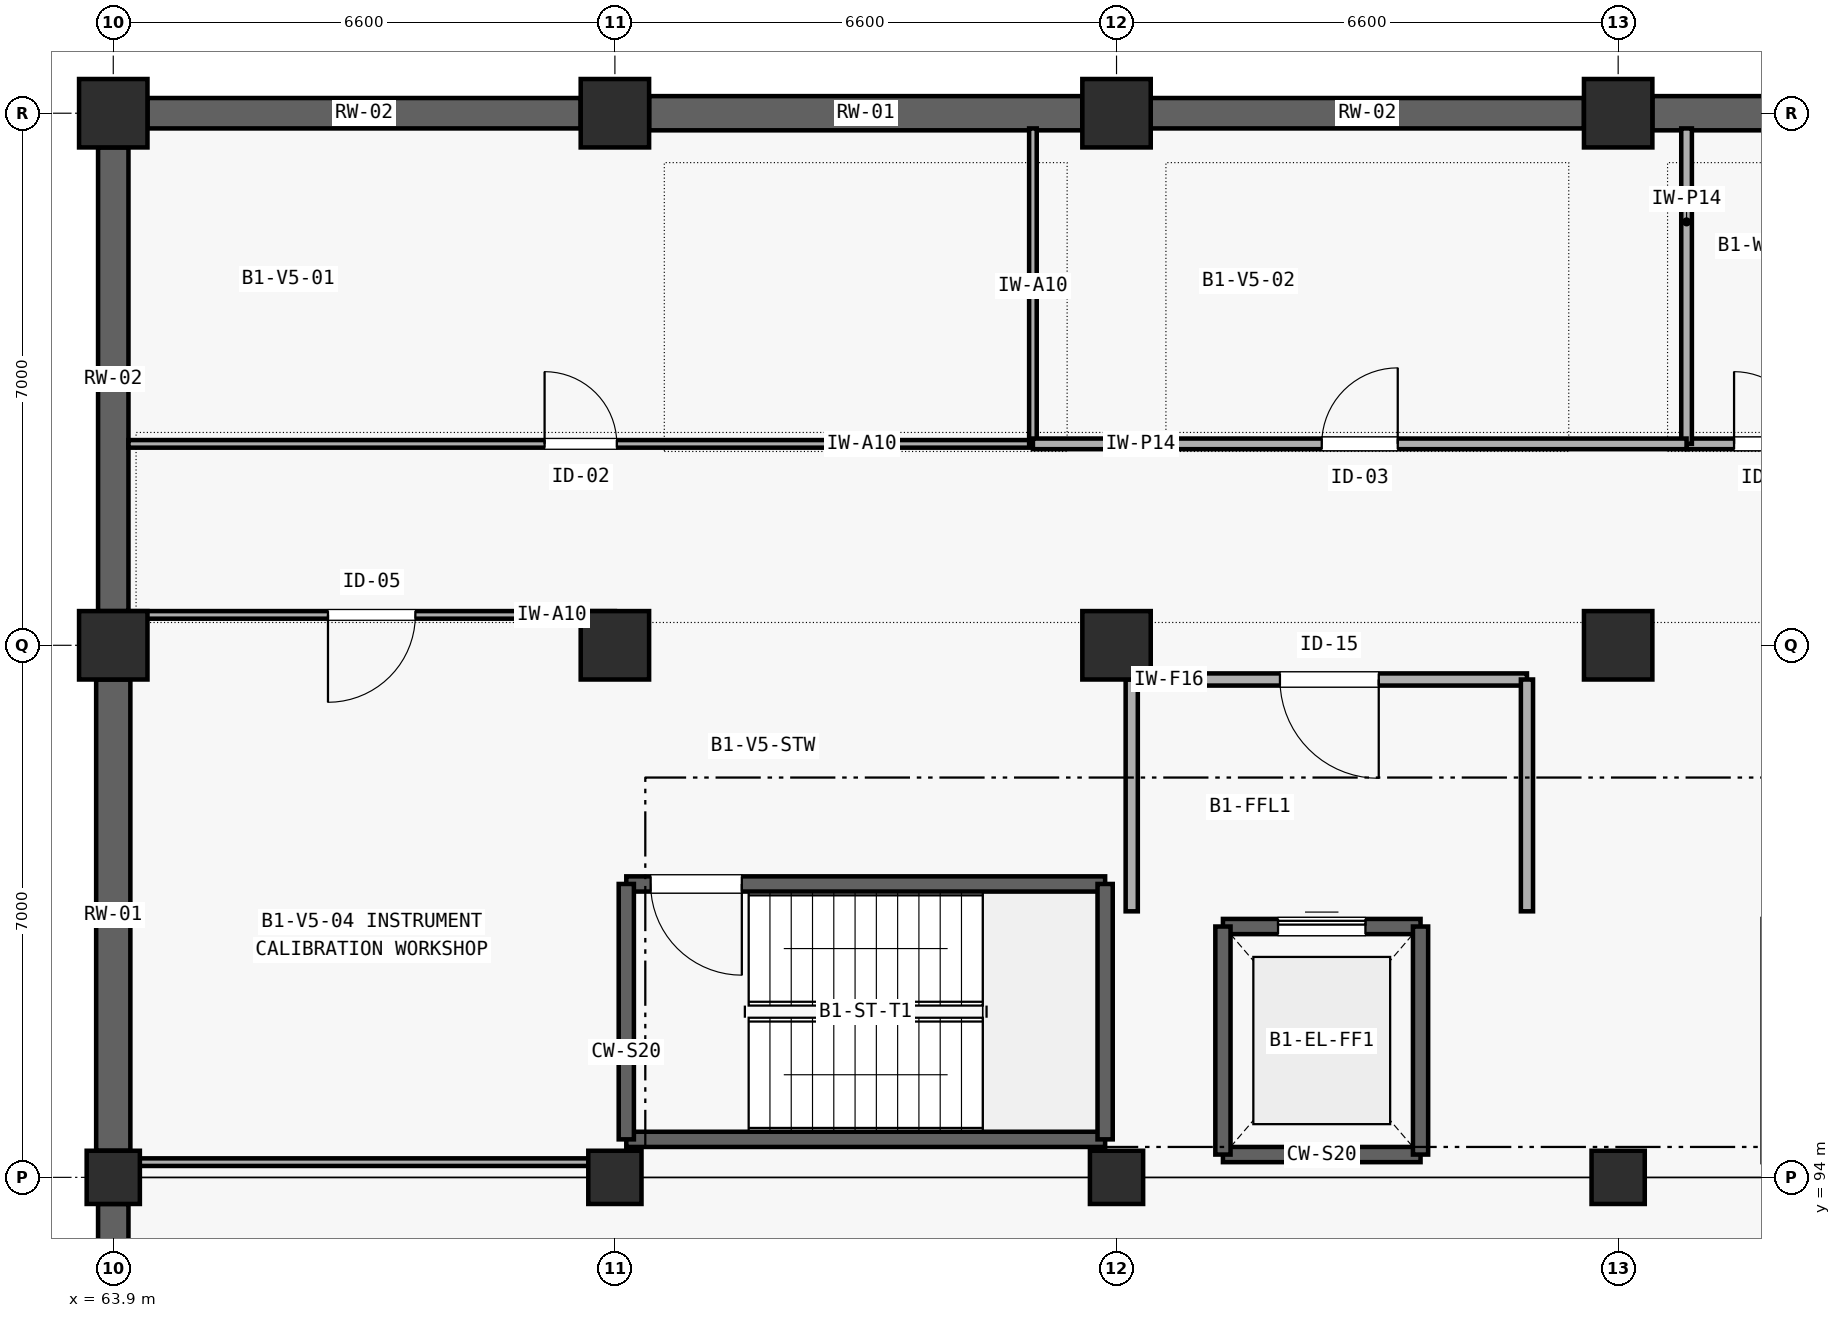
"""IFC4 building model, lengths in metres.
Left out: names, types, materials, properties, quantities, classifications, styles, units other than length and angle.
Written with IfcOpenShell. Run it as: python <this file> out.ifc"""

import sys

from ifc_helpers import new_model, si_unit, direction, frame, frame_2d, origin, origin_2d, place, context, subcontext, project, spatial, rectangle, extrude, element, fill, save


model = new_model("IFC4")
c1 = context("Model", 3, precision=1e-05, world=origin(), true_north=direction((0.0, 1.0)))
c2 = subcontext(c1, "Body", "Model", "MODEL_VIEW")
j1 = project(units=[si_unit("LENGTHUNIT", "METRE"), si_unit("PLANEANGLEUNIT", "RADIAN")], contexts=[c1])
p1 = place(None, origin())
s1 = spatial("IfcSite", under=j1, at=p1, CompositionType="ELEMENT")
p2 = place(p1, origin())
s2 = spatial("IfcBuilding", under=s1, at=p2, CompositionType="ELEMENT")
p3 = place(p2, frame((0.0, 0.0, -4.2)))
s3 = spatial("IfcBuildingStorey", under=s2, at=p3, CompositionType="ELEMENT", Elevation=-4.2)
p4 = place(p3, frame((63.9, 94.0, -0.4), z_axis=(0.0, 0.0, 1.0), x_axis=(1.0, 0.0, 0.0)))
e1 = element("IfcColumn", 1, at=p4, inside=s3, PredefinedType="COLUMN", context=c2, shape_type="SweptSolid", body=[
    extrude(rectangle(XDim=0.7, YDim=0.7, at=origin_2d()), origin(), (0.0, 0.0, 1.0), 4.6),
])
for number, where, z_axis, x_axis in (
    (2, (63.9, 101.0, -0.4), (0.0, 0.0, 1.0), (1.0, 0.0, 0.0)),
    (3, (63.9, 108.0, -0.4), (0.0, 0.0, 1.0), (1.0, 0.0, 0.0)),
):
    element("IfcColumn", number, at=place(p3, frame(where, z_axis=z_axis, x_axis=x_axis)), inside=s3, PredefinedType="COLUMN", context=c2, shape_type="SweptSolid", body=[
        extrude(rectangle(XDim=0.9, YDim=0.9, at=origin_2d()), origin(), (0.0, 0.0, 1.0), 4.6),
    ])
p5 = place(p3, frame((70.5, 94.0, -0.4), z_axis=(0.0, 0.0, 1.0), x_axis=(1.0, 0.0, 0.0)))
e4 = element("IfcColumn", 4, at=p5, inside=s3, PredefinedType="COLUMN", context=c2, shape_type="SweptSolid", body=[
    extrude(rectangle(XDim=0.7, YDim=0.7, at=origin_2d()), origin(), (0.0, 0.0, 1.0), 4.6),
])
for number, where, z_axis, x_axis in (
    (5, (70.5, 101.0, -0.4), (0.0, 0.0, 1.0), (1.0, 0.0, 0.0)),
    (6, (70.5, 108.0, -0.4), (0.0, 0.0, 1.0), (1.0, 0.0, 0.0)),
):
    element("IfcColumn", number, at=place(p3, frame(where, z_axis=z_axis, x_axis=x_axis)), inside=s3, PredefinedType="COLUMN", context=c2, shape_type="SweptSolid", body=[
        extrude(rectangle(XDim=0.9, YDim=0.9, at=origin_2d()), origin(), (0.0, 0.0, 1.0), 4.6),
    ])
p6 = place(p3, frame((77.1, 94.0, -0.4), z_axis=(0.0, 0.0, 1.0), x_axis=(1.0, 0.0, 0.0)))
e7 = element("IfcColumn", 7, at=p6, inside=s3, PredefinedType="COLUMN", context=c2, shape_type="SweptSolid", body=[
    extrude(rectangle(XDim=0.7, YDim=0.7, at=origin_2d()), origin(), (0.0, 0.0, 1.0), 4.6),
])
for number, where, z_axis, x_axis in (
    (8, (77.1, 101.0, -0.4), (0.0, 0.0, 1.0), (1.0, 0.0, 0.0)),
    (9, (77.1, 108.0, -0.4), (0.0, 0.0, 1.0), (1.0, 0.0, 0.0)),
):
    element("IfcColumn", number, at=place(p3, frame(where, z_axis=z_axis, x_axis=x_axis)), inside=s3, PredefinedType="COLUMN", context=c2, shape_type="SweptSolid", body=[
        extrude(rectangle(XDim=0.9, YDim=0.9, at=origin_2d()), origin(), (0.0, 0.0, 1.0), 4.6),
    ])
p7 = place(p3, frame((83.7, 94.0, -0.4), z_axis=(0.0, 0.0, 1.0), x_axis=(1.0, 0.0, 0.0)))
e10 = element("IfcColumn", 10, at=p7, inside=s3, PredefinedType="COLUMN", context=c2, shape_type="SweptSolid", body=[
    extrude(rectangle(XDim=0.7, YDim=0.7, at=origin_2d()), origin(), (0.0, 0.0, 1.0), 4.6),
])
for number, where, z_axis, x_axis in (
    (11, (83.7, 101.0, -0.4), (0.0, 0.0, 1.0), (1.0, 0.0, 0.0)),
    (12, (83.7, 108.0, -0.4), (0.0, 0.0, 1.0), (1.0, 0.0, 0.0)),
):
    element("IfcColumn", number, at=place(p3, frame(where, z_axis=z_axis, x_axis=x_axis)), inside=s3, PredefinedType="COLUMN", context=c2, shape_type="SweptSolid", body=[
        extrude(rectangle(XDim=0.9, YDim=0.9, at=origin_2d()), origin(), (0.0, 0.0, 1.0), 4.6),
    ])
p8 = place(p3, frame((64.35, 108.0, 0.0), z_axis=(0.0, 0.0, 1.0), x_axis=(1.0, 0.0, 0.0)))
e13 = element("IfcWall", 13, at=p8, inside=s3, PredefinedType="SHEAR", context=c2, shape_type="SweptSolid", body=[
    extrude(rectangle(XDim=5.7, YDim=0.4, at=frame_2d((2.85, 0.0))), origin(), (0.0, 0.0, 1.0), 3.85),
])
p9 = place(p3, frame((70.95, 108.0, 0.0), z_axis=(0.0, 0.0, 1.0), x_axis=(1.0, 0.0, 0.0)))
e14 = element("IfcWall", 14, at=p9, inside=s3, PredefinedType="SHEAR", context=c2, shape_type="SweptSolid", body=[
    extrude(rectangle(XDim=5.7, YDim=0.45, at=frame_2d((2.85, 0.0))), origin(), (0.0, 0.0, 1.0), 3.85),
])
p10 = place(p3, frame((77.55, 108.0, 0.0), z_axis=(0.0, 0.0, 1.0), x_axis=(1.0, 0.0, 0.0)))
e15 = element("IfcWall", 15, at=p10, inside=s3, PredefinedType="SHEAR", context=c2, shape_type="SweptSolid", body=[
    extrude(rectangle(XDim=5.7, YDim=0.4, at=frame_2d((2.85, 0.0))), origin(), (0.0, 0.0, 1.0), 3.85),
])
p11 = place(p3, frame((84.15, 108.0, 0.0), z_axis=(0.0, 0.0, 1.0), x_axis=(1.0, 0.0, 0.0)))
e16 = element("IfcWall", 16, at=p11, inside=s3, PredefinedType="SHEAR", context=c2, shape_type="SweptSolid", body=[
    extrude(rectangle(XDim=5.7, YDim=0.45, at=frame_2d((2.85, 0.0))), origin(), (0.0, 0.0, 1.0), 3.85),
])
p12 = place(p3, frame((63.9, 87.35, 0.0), z_axis=(0.0, 0.0, 1.0), x_axis=(0.0, 1.0, 0.0)))
e17 = element("IfcWall", 17, at=p12, inside=s3, PredefinedType="SHEAR", context=c2, shape_type="SweptSolid", body=[
    extrude(rectangle(XDim=6.3, YDim=0.4, at=frame_2d((3.15, 0.0))), origin(), (0.0, 0.0, 1.0), 3.85),
])
p13 = place(p3, frame((63.9, 94.35, 0.0), z_axis=(0.0, 0.0, 1.0), x_axis=(0.0, 1.0, 0.0)))
e18 = element("IfcWall", 18, at=p13, inside=s3, PredefinedType="SHEAR", context=c2, shape_type="SweptSolid", body=[
    extrude(rectangle(XDim=6.2, YDim=0.45, at=frame_2d((3.1, 0.0))), origin(), (0.0, 0.0, 1.0), 3.85),
])
p14 = place(p3, frame((63.9, 101.45, 0.0), z_axis=(0.0, 0.0, 1.0), x_axis=(0.0, 1.0, 0.0)))
e19 = element("IfcWall", 19, at=p14, inside=s3, PredefinedType="SHEAR", context=c2, shape_type="SweptSolid", body=[
    extrude(rectangle(XDim=6.1, YDim=0.4, at=frame_2d((3.05, 0.0))), origin(), (0.0, 0.0, 1.0), 3.85),
])
p15 = place(p3, frame((70.65, 94.5, -0.4), z_axis=(0.0, 0.0, 1.0), x_axis=(1.0, 0.0, 0.0)))
e20 = element("IfcWall", 20, at=p15, inside=s3, PredefinedType="SHEAR", context=c2, shape_type="SweptSolid", body=[
    extrude(rectangle(XDim=6.3, YDim=0.2, at=frame_2d((3.15, 0.0))), origin(), (0.0, 0.0, 1.0), 4.6),
])
p16 = place(p3, frame((70.65, 97.86, -0.4), z_axis=(0.0, 0.0, 1.0), x_axis=(1.0, 0.0, 0.0)))
e21 = element("IfcWall", 21, at=p16, inside=s3, PredefinedType="SHEAR", context=c2, shape_type="SweptSolid", body=[
    extrude(rectangle(XDim=6.3, YDim=0.2, at=frame_2d((3.15, 0.0))), origin(), (0.0, 0.0, 1.0), 4.6),
])
p17 = place(p16, frame((0.32, 0.0, 0.4)))
e22 = element("IfcOpeningElement", 22, at=p17, cuts=e21, PredefinedType="OPENING", context=c2, shape_type="SweptSolid", body=[
    extrude(rectangle(XDim=1.2, YDim=2.15, at=frame_2d((0.6, 1.075))), frame((0.0, 0.11, 0.0), z_axis=(0.0, -1.0, 0.0), x_axis=(1.0, 0.0, 0.0)), (0.0, 0.0, 1.0), 0.22),
])
for number, where, z_axis, x_axis in (
    (23, (70.65, 94.5, -0.4), (0.0, 0.0, 1.0), (0.0, 1.0, 0.0)),
    (24, (76.95, 94.5, -0.4), (0.0, 0.0, 1.0), (0.0, 1.0, 0.0)),
):
    element("IfcWall", number, at=place(p3, frame(where, z_axis=z_axis, x_axis=x_axis)), inside=s3, PredefinedType="SHEAR", context=c2, shape_type="SweptSolid", body=[
        extrude(rectangle(XDim=3.36, YDim=0.2, at=frame_2d((1.68, 0.0))), origin(), (0.0, 0.0, 1.0), 4.6),
    ])
p18 = place(p3, frame((78.5, 94.3, -0.4), z_axis=(0.0, 0.0, 1.0), x_axis=(1.0, 0.0, 0.0)))
e25 = element("IfcWall", 25, at=p18, inside=s3, PredefinedType="SHEAR", context=c2, shape_type="SweptSolid", body=[
    extrude(rectangle(XDim=2.6, YDim=0.2, at=frame_2d((1.3, 0.0))), origin(), (0.0, 0.0, 1.0), 4.6),
])
p19 = place(p3, frame((78.5, 97.3, -0.4), z_axis=(0.0, 0.0, 1.0), x_axis=(1.0, 0.0, 0.0)))
e26 = element("IfcWall", 26, at=p19, inside=s3, PredefinedType="SHEAR", context=c2, shape_type="SweptSolid", body=[
    extrude(rectangle(XDim=2.6, YDim=0.2, at=frame_2d((1.3, 0.0))), origin(), (0.0, 0.0, 1.0), 4.6),
])
p20 = place(p19, frame((0.725, 0.0, 0.4)))
e27 = element("IfcOpeningElement", 27, at=p20, cuts=e26, PredefinedType="OPENING", context=c2, shape_type="SweptSolid", body=[
    extrude(rectangle(XDim=1.15, YDim=2.2, at=frame_2d((0.575, 1.1))), frame((0.0, 0.11, 0.0), z_axis=(0.0, -1.0, 0.0), x_axis=(1.0, 0.0, 0.0)), (0.0, 0.0, 1.0), 0.22),
])
for number, where, z_axis, x_axis in (
    (28, (78.5, 94.3, -0.4), (0.0, 0.0, 1.0), (0.0, 1.0, 0.0)),
    (29, (81.1, 94.3, -0.4), (0.0, 0.0, 1.0), (0.0, 1.0, 0.0)),
):
    element("IfcWall", number, at=place(p3, frame(where, z_axis=z_axis, x_axis=x_axis)), inside=s3, PredefinedType="SHEAR", context=c2, shape_type="SweptSolid", body=[
        extrude(rectangle(XDim=3.0, YDim=0.2, at=frame_2d((1.5, 0.0))), origin(), (0.0, 0.0, 1.0), 4.6),
    ])
p21 = place(p3, frame((77.3, 100.55, 0.0), z_axis=(0.0, 0.0, 1.0), x_axis=(1.0, 0.0, 0.0)))
e30 = element("IfcWall", 30, at=p21, inside=s3, PredefinedType="SOLIDWALL", context=c2, shape_type="SweptSolid", body=[
    extrude(rectangle(XDim=5.2, YDim=0.16, at=frame_2d((2.6, 0.0))), origin(), (0.0, 0.0, 1.0), 3.9),
])
p22 = place(p21, frame((1.95, 0.0, 0.0)))
e31 = element("IfcOpeningElement", 31, at=p22, cuts=e30, PredefinedType="OPENING", context=c2, shape_type="SweptSolid", body=[
    extrude(rectangle(XDim=1.3, YDim=2.15, at=frame_2d((0.65, 1.075))), frame((0.0, 0.09, 0.0), z_axis=(0.0, -1.0, 0.0), x_axis=(1.0, 0.0, 0.0)), (0.0, 0.0, 1.0), 0.18),
])
p23 = place(p3, frame((77.3, 97.5, 0.0), z_axis=(0.0, 0.0, 1.0), x_axis=(0.0, 1.0, 0.0)))
e32 = element("IfcWall", 32, at=p23, inside=s3, PredefinedType="SOLIDWALL", context=c2, shape_type="SweptSolid", body=[
    extrude(rectangle(XDim=3.05, YDim=0.16, at=frame_2d((1.525, 0.0))), origin(), (0.0, 0.0, 1.0), 3.405),
])
p24 = place(p3, frame((82.5, 97.5, 0.0), z_axis=(0.0, 0.0, 1.0), x_axis=(0.0, 1.0, 0.0)))
e33 = element("IfcWall", 33, at=p24, inside=s3, PredefinedType="SOLIDWALL", context=c2, shape_type="SweptSolid", body=[
    extrude(rectangle(XDim=3.05, YDim=0.16, at=frame_2d((1.525, 0.0))), origin(), (0.0, 0.0, 1.0), 3.9),
])
p25 = place(p3, frame((84.6, 103.65, 0.0), z_axis=(0.0, 0.0, 1.0), x_axis=(1.0, 0.0, 0.0)))
e34 = element("IfcWall", 34, at=p25, inside=s3, PredefinedType="PLUMBINGWALL", context=c2, shape_type="SweptSolid", body=[
    extrude(rectangle(XDim=2.2, YDim=0.14, at=frame_2d((1.1, 0.0))), origin(), (0.0, 0.0, 1.0), 3.9),
])
p26 = place(p25, frame((0.625, 0.0, 0.0)))
e35 = element("IfcOpeningElement", 35, at=p26, cuts=e34, PredefinedType="OPENING", context=c2, shape_type="SweptSolid", body=[
    extrude(rectangle(XDim=0.95, YDim=2.1, at=frame_2d((0.475, 1.05))), frame((0.0, 0.08, 0.0), z_axis=(0.0, -1.0, 0.0), x_axis=(1.0, 0.0, 0.0)), (0.0, 0.0, 1.0), 0.16),
])
p27 = place(p3, frame((84.6, 103.65, 0.0), z_axis=(0.0, 0.0, 1.0), x_axis=(0.0, 1.0, 0.0)))
e36 = element("IfcWall", 36, at=p27, inside=s3, PredefinedType="PLUMBINGWALL", context=c2, shape_type="SweptSolid", body=[
    extrude(rectangle(XDim=4.15, YDim=0.14, at=frame_2d((2.075, 0.0))), origin(), (0.0, 0.0, 1.0), 3.9),
])
p28 = place(p3, frame((64.1, 103.65, 0.0), z_axis=(0.0, 0.0, 1.0), x_axis=(1.0, 0.0, 0.0)))
e37 = element("IfcWall", 37, at=p28, inside=s3, PredefinedType="PARTITIONING", context=c2, shape_type="SweptSolid", body=[
    extrude(rectangle(XDim=11.9, YDim=0.1, at=frame_2d((5.95, 0.0))), origin(), (0.0, 0.0, 1.0), 3.9),
])
p29 = place(p28, frame((5.475, 0.0, 0.0)))
e38 = element("IfcOpeningElement", 38, at=p29, cuts=e37, PredefinedType="OPENING", context=c2, shape_type="SweptSolid", body=[
    extrude(rectangle(XDim=0.95, YDim=2.1, at=frame_2d((0.475, 1.05))), frame((0.0, 0.06, 0.0), z_axis=(0.0, -1.0, 0.0), x_axis=(1.0, 0.0, 0.0)), (0.0, 0.0, 1.0), 0.12),
])
p30 = place(p3, frame((76.0, 103.65, 0.0), z_axis=(0.0, 0.0, 1.0), x_axis=(0.0, 1.0, 0.0)))
e39 = element("IfcWall", 39, at=p30, inside=s3, PredefinedType="PARTITIONING", context=c2, shape_type="SweptSolid", body=[
    extrude(rectangle(XDim=4.15, YDim=0.1, at=frame_2d((2.075, 0.0))), origin(), (0.0, 0.0, 1.0), 3.9),
])
p31 = place(p3, frame((76.0, 103.65, 0.0), z_axis=(0.0, 0.0, 1.0), x_axis=(1.0, 0.0, 0.0)))
e40 = element("IfcWall", 40, at=p31, inside=s3, PredefinedType="PLUMBINGWALL", context=c2, shape_type="SweptSolid", body=[
    extrude(rectangle(XDim=8.6, YDim=0.14, at=frame_2d((4.3, 0.0))), origin(), (0.0, 0.0, 1.0), 3.9),
])
p32 = place(p31, frame((3.8, 0.0, 0.0)))
e41 = element("IfcOpeningElement", 41, at=p32, cuts=e40, PredefinedType="OPENING", context=c2, shape_type="SweptSolid", body=[
    extrude(rectangle(XDim=1.0, YDim=2.1, at=frame_2d((0.5, 1.05))), frame((0.0, 0.08, 0.0), z_axis=(0.0, -1.0, 0.0), x_axis=(1.0, 0.0, 0.0)), (0.0, 0.0, 1.0), 0.16),
])
p33 = place(p3, frame((64.1, 94.2, 0.0), z_axis=(0.0, 0.0, 1.0), x_axis=(1.0, 0.0, 0.0)))
e42 = element("IfcWall", 42, at=p33, inside=s3, PredefinedType="PARTITIONING", context=c2, shape_type="SweptSolid", body=[
    extrude(rectangle(XDim=6.4, YDim=0.1, at=frame_2d((3.2, 0.0))), origin(), (0.0, 0.0, 1.0), 3.385),
])
p34 = place(p3, frame((64.1, 101.4, 0.0), z_axis=(0.0, 0.0, 1.0), x_axis=(1.0, 0.0, 0.0)))
e43 = element("IfcWall", 43, at=p34, inside=s3, PredefinedType="PARTITIONING", context=c2, shape_type="SweptSolid", body=[
    extrude(rectangle(XDim=6.4, YDim=0.1, at=frame_2d((3.2, 0.0))), origin(), (0.0, 0.0, 1.0), 3.9),
])
p35 = place(p34, frame((2.625, 0.0, 0.0)))
e44 = element("IfcOpeningElement", 44, at=p35, cuts=e43, PredefinedType="OPENING", context=c2, shape_type="SweptSolid", body=[
    extrude(rectangle(XDim=1.15, YDim=2.15, at=frame_2d((0.575, 1.075))), frame((0.0, 0.06, 0.0), z_axis=(0.0, -1.0, 0.0), x_axis=(1.0, 0.0, 0.0)), (0.0, 0.0, 1.0), 0.12),
])
p36 = place(p17, frame((1.2, 0.0, 0.0), z_axis=(0.0, 0.0, 1.0), x_axis=(-1.0, 0.0, 0.0)))
e45 = element("IfcDoor", 45, at=p36, inside=s3, OperationType="SINGLE_SWING_LEFT", PredefinedType="DOOR", context=c2, shape_type="SweptSolid", body=[
    extrude(rectangle(XDim=1.2, YDim=2.15, at=frame_2d((0.6, 1.075))), frame((0.0, 0.025, 0.0), z_axis=(0.0, -1.0, 0.0), x_axis=(1.0, 0.0, 0.0)), (0.0, 0.0, 1.0), 0.05),
])
fill(e22, e45)
p37 = place(p20, origin())
e46 = element("IfcDoor", 46, at=p37, inside=s3, OperationType="SLIDING_TO_LEFT", PredefinedType="DOOR", context=c2, shape_type="SweptSolid", body=[
    extrude(rectangle(XDim=1.15, YDim=2.2, at=frame_2d((0.575, 1.1))), frame((0.0, 0.025, 0.0), z_axis=(0.0, -1.0, 0.0), x_axis=(1.0, 0.0, 0.0)), (0.0, 0.0, 1.0), 0.05),
])
fill(e27, e46)
p38 = place(p22, frame((1.3, 0.0, 0.0), z_axis=(0.0, 0.0, 1.0), x_axis=(-1.0, 0.0, 0.0)))
e47 = element("IfcDoor", 47, at=p38, inside=s3, OperationType="SINGLE_SWING_LEFT", PredefinedType="DOOR", context=c2, shape_type="SweptSolid", body=[
    extrude(rectangle(XDim=1.3, YDim=2.15, at=frame_2d((0.65, 1.075))), frame((0.0, 0.025, 0.0), z_axis=(0.0, -1.0, 0.0), x_axis=(1.0, 0.0, 0.0)), (0.0, 0.0, 1.0), 0.05),
])
fill(e31, e47)
p39 = place(p26, origin())
e48 = element("IfcDoor", 48, at=p39, inside=s3, OperationType="SINGLE_SWING_LEFT", PredefinedType="DOOR", context=c2, shape_type="SweptSolid", body=[
    extrude(rectangle(XDim=0.95, YDim=2.1, at=frame_2d((0.475, 1.05))), frame((0.0, 0.025, 0.0), z_axis=(0.0, -1.0, 0.0), x_axis=(1.0, 0.0, 0.0)), (0.0, 0.0, 1.0), 0.05),
])
fill(e35, e48)
p40 = place(p29, origin())
e49 = element("IfcDoor", 49, at=p40, inside=s3, OperationType="SINGLE_SWING_LEFT", PredefinedType="DOOR", context=c2, shape_type="SweptSolid", body=[
    extrude(rectangle(XDim=0.95, YDim=2.1, at=frame_2d((0.475, 1.05))), frame((0.0, 0.025, 0.0), z_axis=(0.0, -1.0, 0.0), x_axis=(1.0, 0.0, 0.0)), (0.0, 0.0, 1.0), 0.05),
])
fill(e38, e49)
p41 = place(p32, origin())
e50 = element("IfcDoor", 50, at=p41, inside=s3, OperationType="SINGLE_SWING_RIGHT", PredefinedType="DOOR", context=c2, shape_type="SweptSolid", body=[
    extrude(rectangle(XDim=1.0, YDim=2.1, at=frame_2d((0.5, 1.05))), frame((0.0, 0.025, 0.0), z_axis=(0.0, -1.0, 0.0), x_axis=(1.0, 0.0, 0.0)), (0.0, 0.0, 1.0), 0.05),
])
fill(e41, e50)
p42 = place(p35, frame((1.15, 0.0, 0.0), z_axis=(0.0, 0.0, 1.0), x_axis=(-1.0, 0.0, 0.0)))
e51 = element("IfcDoor", 51, at=p42, inside=s3, OperationType="SINGLE_SWING_RIGHT", PredefinedType="DOOR", context=c2, shape_type="SweptSolid", body=[
    extrude(rectangle(XDim=1.15, YDim=2.15, at=frame_2d((0.575, 1.075))), frame((0.0, 0.025, 0.0), z_axis=(0.0, -1.0, 0.0), x_axis=(1.0, 0.0, 0.0)), (0.0, 0.0, 1.0), 0.05),
])
fill(e44, e51)
save(model, sys.argv[1])
